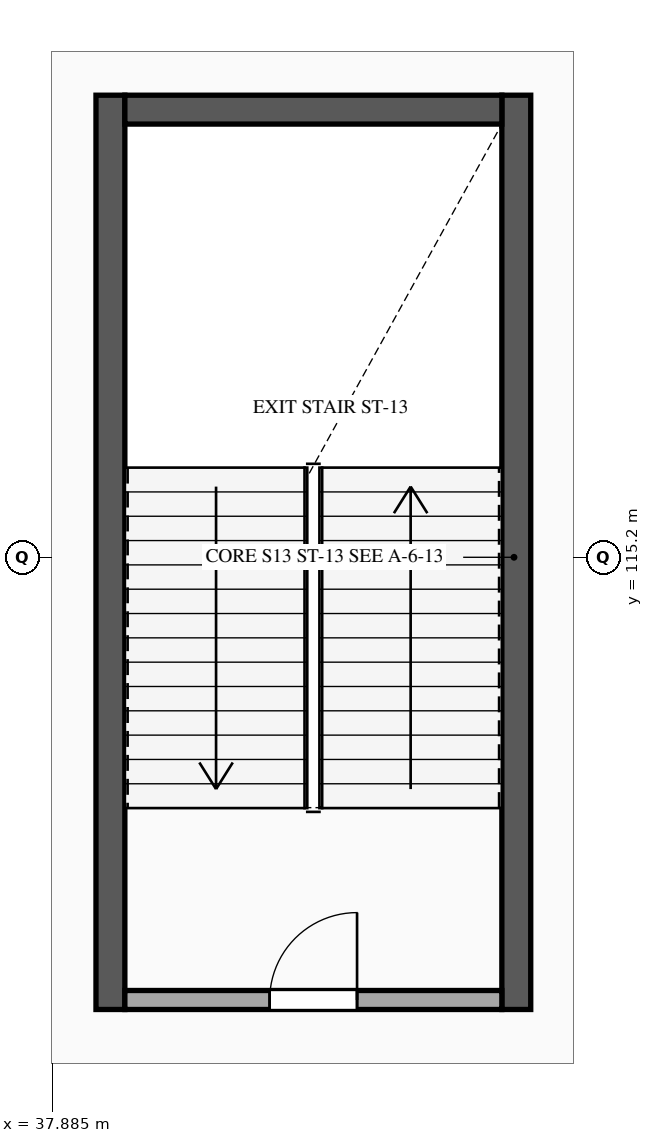
"""IFC4 building model, lengths in metres.
Left out: names, types, materials, properties, quantities, classifications, styles, units other than length and angle.
Written with IfcOpenShell. Run it as: python <this file> out.ifc"""

import sys

from ifc_helpers import new_model, si_unit, direction, frame, frame_2d, origin, place, context, subcontext, project, spatial, rectangle, extrude, element, fill, save


model = new_model("IFC4")
c1 = context("Model", 3, precision=1e-05, world=origin(), true_north=direction((0.0, 1.0)))
c2 = subcontext(c1, "Body", "Model", "MODEL_VIEW")
j1 = project(units=[si_unit("LENGTHUNIT", "METRE"), si_unit("PLANEANGLEUNIT", "RADIAN")], contexts=[c1])
p1 = place(None, origin())
s1 = spatial("IfcSite", under=j1, at=p1, CompositionType="ELEMENT")
p2 = place(p1, origin())
s2 = spatial("IfcBuilding", under=s1, at=p2, CompositionType="ELEMENT")
p3 = place(p2, frame((0.0, 0.0, 19.8)))
s3 = spatial("IfcBuildingStorey", under=s2, at=p3, CompositionType="ELEMENT", Elevation=19.8)
for number, where, z_axis, x_axis in (
    (1, (38.65, 109.25, 0.0), (0.0, 0.0, 1.0), (0.0, 1.0, 0.0)),
    (2, (43.99, 121.28, 0.0), (0.0, 0.0, 1.0), (0.0, -1.0, 0.0)),
):
    element("IfcWall", number, at=place(p3, frame(where, z_axis=z_axis, x_axis=x_axis)), inside=s3, PredefinedType="SHEAR", context=c2, shape_type="SweptSolid", body=[
        extrude(rectangle(XDim=12.03, YDim=0.38, at=frame_2d((6.015, 0.0))), origin(), (0.0, 0.0, 1.0), 4.26),
    ])
p4 = place(p3, frame((38.84, 121.09, 0.0), z_axis=(0.0, 0.0, 1.0), x_axis=(1.0, 0.0, 0.0)))
e3 = element("IfcWall", 3, at=p4, inside=s3, PredefinedType="SHEAR", context=c2, shape_type="SweptSolid", body=[
    extrude(rectangle(XDim=4.96, YDim=0.38, at=frame_2d((2.48, 0.0))), origin(), (0.0, 0.0, 1.0), 4.26),
])
p5 = place(p3, frame((38.84, 109.375, 0.0), z_axis=(0.0, 0.0, 1.0), x_axis=(1.0, 0.0, 0.0)))
e4 = element("IfcWall", 4, at=p5, inside=s3, PredefinedType="STANDARD", context=c2, shape_type="SweptSolid", body=[
    extrude(rectangle(XDim=4.96, YDim=0.25, at=frame_2d((2.48, 0.0))), origin(), (0.0, 0.0, 1.0), 4.25),
])
p6 = place(p5, frame((1.905, 0.0, 0.0)))
e5 = element("IfcOpeningElement", 5, at=p6, cuts=e4, PredefinedType="OPENING", context=c2, shape_type="SweptSolid", body=[
    extrude(rectangle(XDim=1.15, YDim=2.2, at=frame_2d((0.575, 1.1))), frame((0.0, 0.135, 0.0), z_axis=(0.0, -1.0, 0.0), x_axis=(1.0, 0.0, 0.0)), (0.0, 0.0, 1.0), 0.27),
])
p7 = place(p6, origin())
e6 = element("IfcDoor", 6, at=p7, inside=s3, OperationType="SINGLE_SWING_RIGHT", PredefinedType="DOOR", context=c2, shape_type="SweptSolid", body=[
    extrude(rectangle(XDim=1.15, YDim=2.2, at=frame_2d((0.575, 1.1))), frame((0.0, 0.025, 0.0), z_axis=(0.0, -1.0, 0.0), x_axis=(1.0, 0.0, 0.0)), (0.0, 0.0, 1.0), 0.05),
])
fill(e5, e6)
save(model, sys.argv[1])
